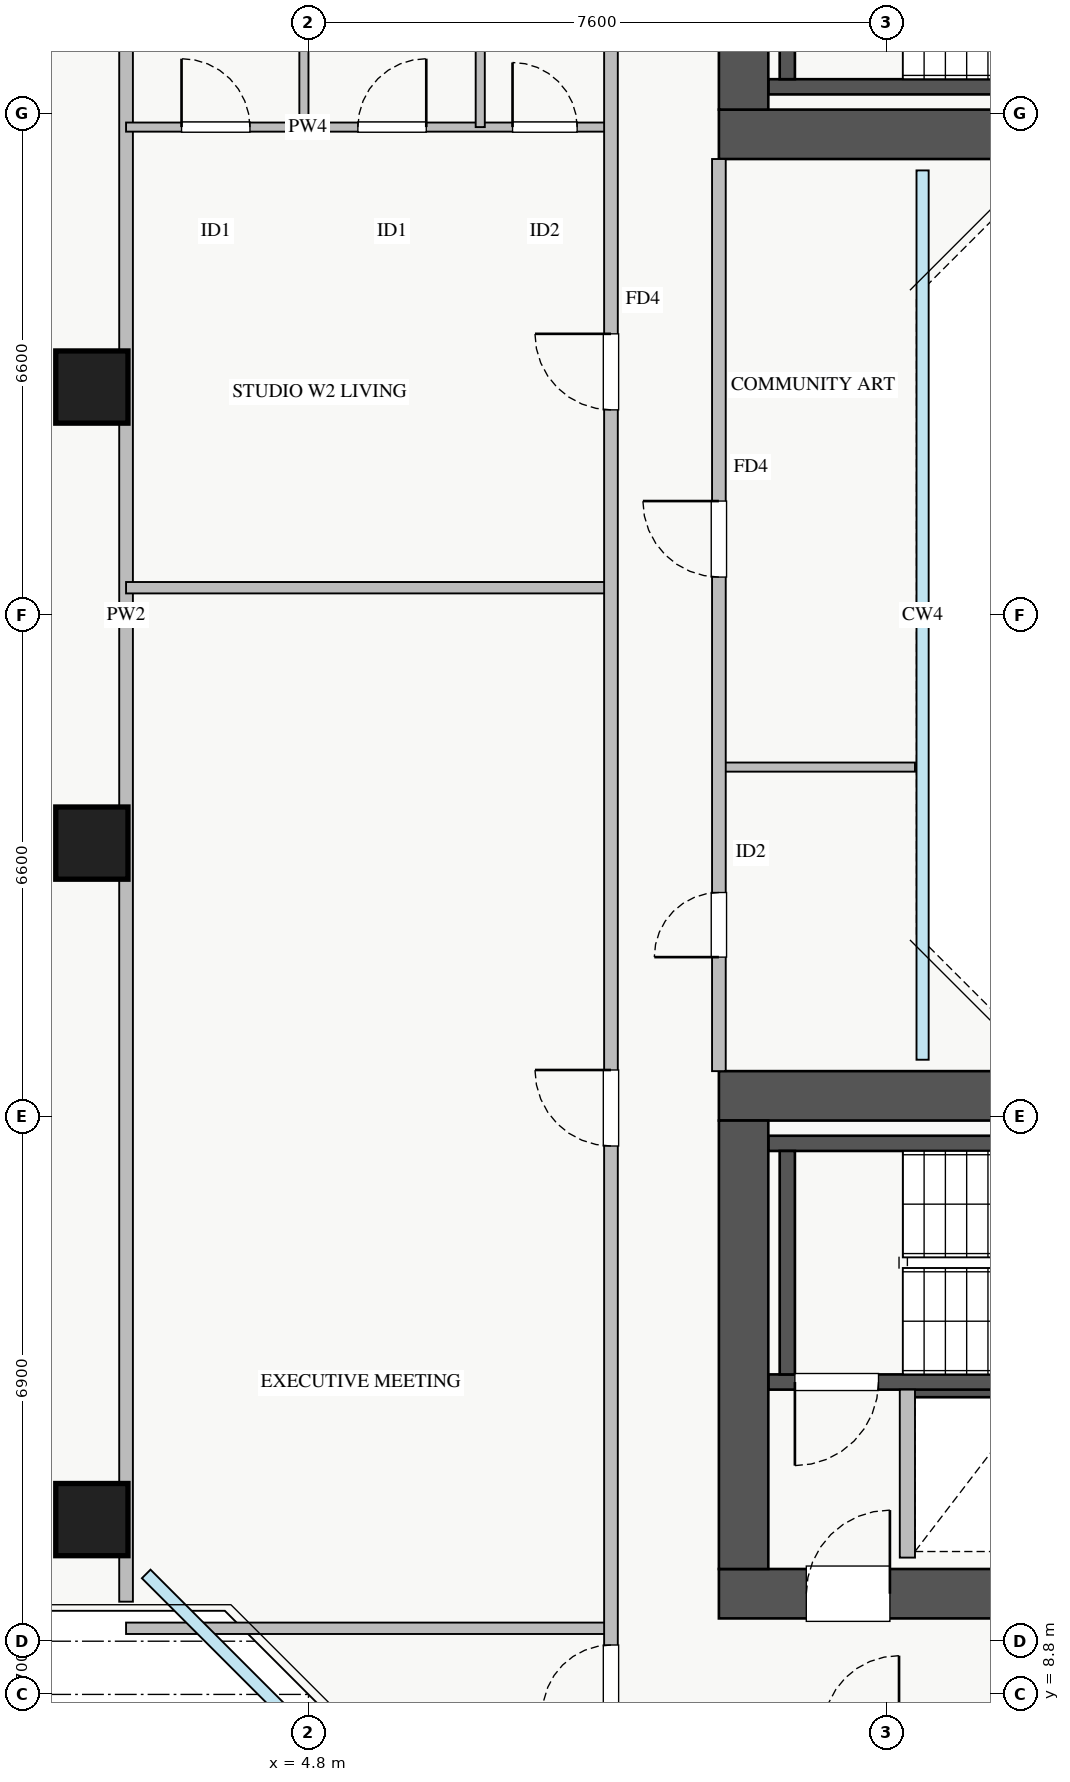
"""IFC4 building model, lengths in metres.
Left out: names, types, materials, properties, quantities, classifications, styles, units other than length and angle.
Written with IfcOpenShell. Run it as: python <this file> out.ifc"""

import sys

from ifc_helpers import new_model, si_unit, direction, frame, frame_2d, origin, origin_2d, place, context, subcontext, project, spatial, rectangle, extrude, source, transform, mapped, element, fill, save


model = new_model("IFC4")
c1 = context("Model", 3, precision=1e-05, world=origin(), true_north=direction((0.0, 1.0)))
c2 = subcontext(c1, "Body", "Model", "MODEL_VIEW")
j1 = project(units=[si_unit("LENGTHUNIT", "METRE"), si_unit("PLANEANGLEUNIT", "RADIAN")], contexts=[c1])
p1 = place(None, origin())
s1 = spatial("IfcSite", under=j1, at=p1, CompositionType="ELEMENT")
p2 = place(p1, origin())
s2 = spatial("IfcBuilding", under=s1, at=p2, CompositionType="ELEMENT")
p3 = place(p2, frame((0.0, 0.0, 173.0)))
s3 = spatial("IfcBuildingStorey", under=s2, at=p3, CompositionType="ELEMENT", Elevation=173.0)
p4 = place(p3, frame((12.68, 12.8, 0.0), z_axis=(0.0, 0.0, 1.0), x_axis=(1.0, 0.0, 0.0)))
e1 = element("IfcWall", 1, at=p4, inside=s3, PredefinedType="SHEAR", context=c2, shape_type="SweptSolid", body=[
    extrude(rectangle(XDim=1.94, YDim=0.18, at=frame_2d((0.97, 0.0))), origin(), (0.0, 0.0, 1.0), 3.0),
])
p5 = place(p3, frame((10.85, 29.95, 0.0), z_axis=(0.0, 0.0, 1.0), x_axis=(1.0, 0.0, 0.0)))
e2 = element("IfcWall", 2, at=p5, inside=s3, PredefinedType="SHEAR", context=c2, shape_type="SweptSolid", body=[
    extrude(rectangle(XDim=7.3, YDim=0.2, at=frame_2d((3.65, 0.0))), origin(), (0.0, 0.0, 1.0), 3.25),
])
p6 = place(p3, frame((11.1, 30.05, 0.0), z_axis=(0.0, 0.0, 1.0), x_axis=(0.0, 1.0, 0.0)))
e3 = element("IfcWall", 3, at=p6, inside=s3, PredefinedType="SHEAR", context=c2, shape_type="SweptSolid", body=[
    extrude(rectangle(XDim=2.94, YDim=0.2, at=frame_2d((1.47, 0.0))), origin(), (0.0, 0.0, 1.0), 3.25),
])
p7 = place(p3, frame((10.85, 12.91, 0.0), z_axis=(0.0, 0.0, 1.0), x_axis=(1.0, 0.0, 0.0)))
e4 = element("IfcWall", 4, at=p7, inside=s3, PredefinedType="SHEAR", context=c2, shape_type="SweptSolid", body=[
    extrude(rectangle(XDim=7.3, YDim=0.2, at=frame_2d((3.65, 0.0))), origin(), (0.0, 0.0, 1.0), 3.25),
])
p8 = place(p7, frame((0.35, 0.0, 0.0)))
e5 = element("IfcOpeningElement", 5, at=p8, cuts=e4, PredefinedType="OPENING", context=c2, shape_type="SweptSolid", body=[
    extrude(rectangle(XDim=1.1, YDim=2.05, at=frame_2d((0.55, 1.025))), frame((0.0, 0.11, 0.0), z_axis=(0.0, -1.0, 0.0), x_axis=(1.0, 0.0, 0.0)), (0.0, 0.0, 1.0), 0.22),
])
p9 = place(p3, frame((10.85, 16.05, 0.0), z_axis=(0.0, 0.0, 1.0), x_axis=(1.0, 0.0, 0.0)))
e6 = element("IfcWall", 6, at=p9, inside=s3, PredefinedType="SHEAR", context=c2, shape_type="SweptSolid", body=[
    extrude(rectangle(XDim=7.3, YDim=0.2, at=frame_2d((3.65, 0.0))), origin(), (0.0, 0.0, 1.0), 3.25),
])
p10 = place(p3, frame((11.1, 13.01, 0.0), z_axis=(0.0, 0.0, 1.0), x_axis=(0.0, 1.0, 0.0)))
e7 = element("IfcWall", 7, at=p10, inside=s3, PredefinedType="SHEAR", context=c2, shape_type="SweptSolid", body=[
    extrude(rectangle(XDim=2.94, YDim=0.2, at=frame_2d((1.47, 0.0))), origin(), (0.0, 0.0, 1.0), 3.25),
])
p11 = place(p3, frame((10.2, 29.325, 0.0), z_axis=(0.0, 0.0, 1.0), x_axis=(1.0, 0.0, 0.0)))
e8 = element("IfcWall", 8, at=p11, inside=s3, PredefinedType="SHEAR", context=c2, shape_type="SweptSolid", body=[
    extrude(rectangle(XDim=17.6, YDim=0.65, at=frame_2d((8.8, 0.0))), origin(), (0.0, 0.0, 1.0), 3.25),
])
p12 = place(p3, frame((10.525, 29.65, 0.0), z_axis=(0.0, 0.0, 1.0), x_axis=(0.0, 1.0, 0.0)))
e9 = element("IfcWall", 9, at=p12, inside=s3, PredefinedType="SHEAR", context=c2, shape_type="SweptSolid", body=[
    extrude(rectangle(XDim=5.9, YDim=0.65, at=frame_2d((2.95, 0.0))), origin(), (0.0, 0.0, 1.0), 3.25),
])
p13 = place(p3, frame((10.2, 10.125, 0.0), z_axis=(0.0, 0.0, 1.0), x_axis=(1.0, 0.0, 0.0)))
e10 = element("IfcWall", 10, at=p13, inside=s3, PredefinedType="SHEAR", context=c2, shape_type="SweptSolid", body=[
    extrude(rectangle(XDim=17.6, YDim=0.65, at=frame_2d((8.8, 0.0))), origin(), (0.0, 0.0, 1.0), 3.25),
])
p14 = place(p13, frame((1.15, 0.0, 0.0)))
e11 = element("IfcOpeningElement", 11, at=p14, cuts=e10, PredefinedType="OPENING", context=c2, shape_type="SweptSolid", body=[
    extrude(rectangle(XDim=1.1, YDim=2.05, at=frame_2d((0.55, 1.025))), frame((0.0, 0.335, 0.0), z_axis=(0.0, -1.0, 0.0), x_axis=(1.0, 0.0, 0.0)), (0.0, 0.0, 1.0), 0.67),
])
p15 = place(p13, frame((8.3, 0.0, 0.0)))
e12 = element("IfcOpeningElement", 12, at=p15, cuts=e10, PredefinedType="OPENING", context=c2, shape_type="SweptSolid", body=[
    extrude(rectangle(XDim=1.1, YDim=2.05, at=frame_2d((0.55, 1.025))), frame((0.0, 0.335, 0.0), z_axis=(0.0, -1.0, 0.0), x_axis=(1.0, 0.0, 0.0)), (0.0, 0.0, 1.0), 0.67),
])
p16 = place(p13, frame((4.9, 0.0, 0.0)))
e13 = element("IfcOpeningElement", 13, at=p16, cuts=e10, PredefinedType="OPENING", context=c2, shape_type="SweptSolid", body=[
    extrude(rectangle(XDim=1.1, YDim=2.05, at=frame_2d((0.55, 1.025))), frame((0.0, 0.335, 0.0), z_axis=(0.0, -1.0, 0.0), x_axis=(1.0, 0.0, 0.0)), (0.0, 0.0, 1.0), 0.67),
])
p17 = place(p13, frame((14.74, 0.0, 0.0)))
e14 = element("IfcOpeningElement", 14, at=p17, cuts=e10, PredefinedType="OPENING", context=c2, shape_type="SweptSolid", body=[
    extrude(rectangle(XDim=1.0, YDim=2.05, at=frame_2d((0.5, 1.025))), frame((0.0, 0.335, 0.0), z_axis=(0.0, -1.0, 0.0), x_axis=(1.0, 0.0, 0.0)), (0.0, 0.0, 1.0), 0.67),
])
p18 = place(p13, frame((10.155, 0.0, 0.0)))
e15 = element("IfcOpeningElement", 15, at=p18, cuts=e10, PredefinedType="OPENING", context=c2, shape_type="SweptSolid", body=[
    extrude(rectangle(XDim=1.0, YDim=2.05, at=frame_2d((0.5, 1.025))), frame((0.0, 0.335, 0.0), z_axis=(0.0, -1.0, 0.0), x_axis=(1.0, 0.0, 0.0)), (0.0, 0.0, 1.0), 0.67),
])
p19 = place(p13, frame((11.87, 0.0, 0.0)))
e16 = element("IfcOpeningElement", 16, at=p19, cuts=e10, PredefinedType="OPENING", context=c2, shape_type="SweptSolid", body=[
    extrude(rectangle(XDim=1.0, YDim=2.05, at=frame_2d((0.5, 1.025))), frame((0.0, 0.335, 0.0), z_axis=(0.0, -1.0, 0.0), x_axis=(1.0, 0.0, 0.0)), (0.0, 0.0, 1.0), 0.67),
])
p20 = place(p13, frame((13.46, 0.0, 0.0)))
e17 = element("IfcOpeningElement", 17, at=p20, cuts=e10, PredefinedType="OPENING", context=c2, shape_type="SweptSolid", body=[
    extrude(rectangle(XDim=1.0, YDim=2.05, at=frame_2d((0.5, 1.025))), frame((0.0, 0.335, 0.0), z_axis=(0.0, -1.0, 0.0), x_axis=(1.0, 0.0, 0.0)), (0.0, 0.0, 1.0), 0.67),
])
p21 = place(p3, frame((10.2, 16.675, 0.0), z_axis=(0.0, 0.0, 1.0), x_axis=(1.0, 0.0, 0.0)))
e18 = element("IfcWall", 18, at=p21, inside=s3, PredefinedType="SHEAR", context=c2, shape_type="SweptSolid", body=[
    extrude(rectangle(XDim=17.6, YDim=0.65, at=frame_2d((8.8, 0.0))), origin(), (0.0, 0.0, 1.0), 3.25),
])
p22 = place(p3, frame((10.525, 10.45, 0.0), z_axis=(0.0, 0.0, 1.0), x_axis=(0.0, 1.0, 0.0)))
e19 = element("IfcWall", 19, at=p22, inside=s3, PredefinedType="SHEAR", context=c2, shape_type="SweptSolid", body=[
    extrude(rectangle(XDim=5.9, YDim=0.65, at=frame_2d((2.95, 0.0))), origin(), (0.0, 0.0, 1.0), 3.25),
])
m1 = source(origin(), c2, "Body", "SweptSolid", [
    extrude(rectangle(XDim=0.95, YDim=0.95, at=origin_2d()), origin(), (0.0, 0.0, 1.0), 3.25),
])
for number, where, z_axis, x_axis in (
    (20, (1.95, 26.0, 0.0), (0.0, 0.0, 1.0), (1.0, 0.0, 0.0)),
    (21, (1.95, 20.0, 0.0), (0.0, 0.0, 1.0), (1.0, 0.0, 0.0)),
    (22, (1.95, 11.1, 0.0), (0.0, 0.0, 1.0), (1.0, 0.0, 0.0)),
):
    element("IfcColumn", number, at=place(p3, frame(where, z_axis=z_axis, x_axis=x_axis)), inside=s3, PredefinedType="COLUMN", context=c2, shape_type="MappedRepresentation", body=[
        mapped(m1, transform((0.0, 0.0, 0.0), x_axis=(1.0, 0.0, 0.0), y_axis=(0.0, 1.0, 0.0), z_axis=(0.0, 0.0, 1.0), scale=1.0)),
    ])
p23 = place(p3, frame((12.68, 10.6, 0.0), z_axis=(0.0, 0.0, 1.0), x_axis=(0.0, 1.0, 0.0)))
e23 = element("IfcWall", 23, at=p23, inside=s3, PredefinedType="PARTITIONING", context=c2, shape_type="SweptSolid", body=[
    extrude(rectangle(XDim=2.21, YDim=0.2, at=frame_2d((1.105, 0.0))), origin(), (0.0, 0.0, 1.0), 3.0),
])
p24 = place(p3, frame((2.4, 10.02, 0.0), z_axis=(0.0, 0.0, 1.0), x_axis=(0.0, 1.0, 0.0)))
e24 = element("IfcWall", 24, at=p24, inside=s3, PredefinedType="PARTITIONING", context=c2, shape_type="SweptSolid", body=[
    extrude(rectangle(XDim=25.96, YDim=0.18, at=frame_2d((12.98, 0.0))), origin(), (0.0, 0.0, 1.0), 3.0),
])
p25 = place(p3, frame((2.4, 9.67, 0.0), z_axis=(0.0, 0.0, 1.0), x_axis=(1.0, 0.0, 0.0)))
e25 = element("IfcWall", 25, at=p25, inside=s3, PredefinedType="PARTITIONING", context=c2, shape_type="SweptSolid", body=[
    extrude(rectangle(XDim=6.38, YDim=0.15, at=frame_2d((3.19, 0.0))), origin(), (0.0, 0.0, 1.0), 3.0),
])
p26 = place(p3, frame((2.4, 29.42, 0.0), z_axis=(0.0, 0.0, 1.0), x_axis=(1.0, 0.0, 0.0)))
e26 = element("IfcWall", 26, at=p26, inside=s3, PredefinedType="PLUMBINGWALL", context=c2, shape_type="SweptSolid", body=[
    extrude(rectangle(XDim=6.38, YDim=0.12, at=frame_2d((3.19, 0.0))), origin(), (0.0, 0.0, 1.0), 3.0),
])
p27 = place(p26, frame((0.73, 0.0, 0.0)))
e27 = element("IfcOpeningElement", 27, at=p27, cuts=e26, PredefinedType="OPENING", context=c2, shape_type="SweptSolid", body=[
    extrude(rectangle(XDim=0.9, YDim=2.05, at=frame_2d((0.45, 1.025))), frame((0.0, 0.07, 0.0), z_axis=(0.0, -1.0, 0.0), x_axis=(1.0, 0.0, 0.0)), (0.0, 0.0, 1.0), 0.14),
])
p28 = place(p26, frame((3.05, 0.0, 0.0)))
e28 = element("IfcOpeningElement", 28, at=p28, cuts=e26, PredefinedType="OPENING", context=c2, shape_type="SweptSolid", body=[
    extrude(rectangle(XDim=0.9, YDim=2.05, at=frame_2d((0.45, 1.025))), frame((0.0, 0.07, 0.0), z_axis=(0.0, -1.0, 0.0), x_axis=(1.0, 0.0, 0.0)), (0.0, 0.0, 1.0), 0.14),
])
p29 = place(p26, frame((5.085, 0.0, 0.0)))
e29 = element("IfcOpeningElement", 29, at=p29, cuts=e26, PredefinedType="OPENING", context=c2, shape_type="SweptSolid", body=[
    extrude(rectangle(XDim=0.85, YDim=2.05, at=frame_2d((0.425, 1.025))), frame((0.0, 0.07, 0.0), z_axis=(0.0, -1.0, 0.0), x_axis=(1.0, 0.0, 0.0)), (0.0, 0.0, 1.0), 0.14),
])
p30 = place(p3, frame((4.74, 29.42, 0.0), z_axis=(0.0, 0.0, 1.0), x_axis=(0.0, 1.0, 0.0)))
e30 = element("IfcWall", 30, at=p30, inside=s3, PredefinedType="PLUMBINGWALL", context=c2, shape_type="SweptSolid", body=[
    extrude(rectangle(XDim=6.56, YDim=0.12, at=frame_2d((3.28, 0.0))), origin(), (0.0, 0.0, 1.0), 3.0),
])
p31 = place(p3, frame((7.06, 29.42, 0.0), z_axis=(0.0, 0.0, 1.0), x_axis=(0.0, 1.0, 0.0)))
e31 = element("IfcWall", 31, at=p31, inside=s3, PredefinedType="PLUMBINGWALL", context=c2, shape_type="SweptSolid", body=[
    extrude(rectangle(XDim=6.56, YDim=0.12, at=frame_2d((3.28, 0.0))), origin(), (0.0, 0.0, 1.0), 2.495),
])
p32 = place(p3, frame((2.4, 23.36, 0.0), z_axis=(0.0, 0.0, 1.0), x_axis=(1.0, 0.0, 0.0)))
e32 = element("IfcWall", 32, at=p32, inside=s3, PredefinedType="PARTITIONING", context=c2, shape_type="SweptSolid", body=[
    extrude(rectangle(XDim=6.38, YDim=0.15, at=frame_2d((3.19, 0.0))), origin(), (0.0, 0.0, 1.0), 3.0),
])
p33 = place(p3, frame((8.78, 8.31, 0.0), z_axis=(0.0, 0.0, 1.0), x_axis=(0.0, 1.0, 0.0)))
e33 = element("IfcWall", 33, at=p33, inside=s3, PredefinedType="PARTITIONING", context=c2, shape_type="SweptSolid", body=[
    extrude(rectangle(XDim=29.34, YDim=0.18, at=frame_2d((14.67, 0.0))), origin(), (0.0, 0.0, 1.0), 3.0),
])
p34 = place(p33, frame((28.045, 0.0, 0.0)))
e34 = element("IfcOpeningElement", 34, at=p34, cuts=e33, PredefinedType="OPENING", context=c2, shape_type="SweptSolid", body=[
    extrude(rectangle(XDim=0.9, YDim=2.05, at=frame_2d((0.45, 1.025))), frame((0.0, 0.1, 0.0), z_axis=(0.0, -1.0, 0.0), x_axis=(1.0, 0.0, 0.0)), (0.0, 0.0, 1.0), 0.2),
])
p35 = place(p33, frame((0.24, 0.0, 0.0)))
e35 = element("IfcOpeningElement", 35, at=p35, cuts=e33, PredefinedType="OPENING", context=c2, shape_type="SweptSolid", body=[
    extrude(rectangle(XDim=0.9, YDim=2.05, at=frame_2d((0.45, 1.025))), frame((0.0, 0.1, 0.0), z_axis=(0.0, -1.0, 0.0), x_axis=(1.0, 0.0, 0.0)), (0.0, 0.0, 1.0), 0.2),
])
p36 = place(p33, frame((7.705, 0.0, 0.0)))
e36 = element("IfcOpeningElement", 36, at=p36, cuts=e33, PredefinedType="OPENING", context=c2, shape_type="SweptSolid", body=[
    extrude(rectangle(XDim=1.0, YDim=2.05, at=frame_2d((0.5, 1.025))), frame((0.0, 0.1, 0.0), z_axis=(0.0, -1.0, 0.0), x_axis=(1.0, 0.0, 0.0)), (0.0, 0.0, 1.0), 0.2),
])
p37 = place(p33, frame((17.39, 0.0, 0.0)))
e37 = element("IfcOpeningElement", 37, at=p37, cuts=e33, PredefinedType="OPENING", context=c2, shape_type="SweptSolid", body=[
    extrude(rectangle(XDim=1.0, YDim=2.05, at=frame_2d((0.5, 1.025))), frame((0.0, 0.1, 0.0), z_axis=(0.0, -1.0, 0.0), x_axis=(1.0, 0.0, 0.0)), (0.0, 0.0, 1.0), 0.2),
])
p38 = place(p3, frame((10.2, 21.0, 0.0), z_axis=(0.0, 0.0, 1.0), x_axis=(1.0, 0.0, 0.0)))
e38 = element("IfcWall", 38, at=p38, inside=s3, PredefinedType="PLUMBINGWALL", context=c2, shape_type="SweptSolid", body=[
    extrude(rectangle(XDim=2.58, YDim=0.12, at=frame_2d((1.29, 0.0))), origin(), (0.0, 0.0, 1.0), 3.0),
])
p39 = place(p3, frame((10.2, 17.0, 0.0), z_axis=(0.0, 0.0, 1.0), x_axis=(0.0, 1.0, 0.0)))
e39 = element("IfcWall", 39, at=p39, inside=s3, PredefinedType="PARTITIONING", context=c2, shape_type="SweptSolid", body=[
    extrude(rectangle(XDim=12.0, YDim=0.18, at=frame_2d((6.0, 0.0))), origin(), (0.0, 0.0, 1.0), 3.0),
])
p40 = place(p39, frame((1.5, 0.0, 0.0)))
e40 = element("IfcOpeningElement", 40, at=p40, cuts=e39, PredefinedType="OPENING", context=c2, shape_type="SweptSolid", body=[
    extrude(rectangle(XDim=0.85, YDim=2.05, at=frame_2d((0.425, 1.025))), frame((0.0, 0.1, 0.0), z_axis=(0.0, -1.0, 0.0), x_axis=(1.0, 0.0, 0.0)), (0.0, 0.0, 1.0), 0.2),
])
p41 = place(p39, frame((6.5, 0.0, 0.0)))
e41 = element("IfcOpeningElement", 41, at=p41, cuts=e39, PredefinedType="OPENING", context=c2, shape_type="SweptSolid", body=[
    extrude(rectangle(XDim=1.0, YDim=2.05, at=frame_2d((0.5, 1.025))), frame((0.0, 0.1, 0.0), z_axis=(0.0, -1.0, 0.0), x_axis=(1.0, 0.0, 0.0)), (0.0, 0.0, 1.0), 0.2),
])
m2 = source(origin(), c2, "Body", "SweptSolid", [
    extrude(rectangle(XDim=1.1, YDim=2.05, at=frame_2d((0.55, 1.025))), frame((0.0, 0.025, 0.0), z_axis=(0.0, -1.0, 0.0), x_axis=(1.0, 0.0, 0.0)), (0.0, 0.0, 1.0), 0.05),
])
p42 = place(p14, origin())
e42 = element("IfcDoor", 42, at=p42, inside=s3, OperationType="SINGLE_SWING_RIGHT", PredefinedType="DOOR", context=c2, shape_type="MappedRepresentation", body=[
    mapped(m2, transform((0.0, 0.0, 0.0), x_axis=(1.0, 0.0, 0.0), y_axis=(0.0, 1.0, 0.0), z_axis=(0.0, 0.0, 1.0), scale=1.0)),
])
fill(e11, e42)
p43 = place(p8, frame((1.1, 0.0, 0.0), z_axis=(0.0, 0.0, 1.0), x_axis=(-1.0, 0.0, 0.0)))
e43 = element("IfcDoor", 43, at=p43, inside=s3, OperationType="SINGLE_SWING_LEFT", PredefinedType="DOOR", context=c2, shape_type="MappedRepresentation", body=[
    mapped(m2, transform((0.0, 0.0, 0.0), x_axis=(1.0, 0.0, 0.0), y_axis=(0.0, 1.0, 0.0), z_axis=(0.0, 0.0, 1.0), scale=1.0)),
])
fill(e5, e43)
m3 = source(origin(), c2, "Body", "SweptSolid", [
    extrude(rectangle(XDim=0.9, YDim=2.05, at=frame_2d((0.45, 1.025))), frame((0.0, 0.025, 0.0), z_axis=(0.0, -1.0, 0.0), x_axis=(1.0, 0.0, 0.0)), (0.0, 0.0, 1.0), 0.05),
])
p44 = place(p27, origin())
e44 = element("IfcDoor", 44, at=p44, inside=s3, OperationType="SINGLE_SWING_LEFT", PredefinedType="DOOR", context=c2, shape_type="MappedRepresentation", body=[
    mapped(m3, transform((0.0, 0.0, 0.0), x_axis=(1.0, 0.0, 0.0), y_axis=(0.0, 1.0, 0.0), z_axis=(0.0, 0.0, 1.0), scale=1.0)),
])
fill(e27, e44)
p45 = place(p28, origin())
e45 = element("IfcDoor", 45, at=p45, inside=s3, OperationType="SINGLE_SWING_RIGHT", PredefinedType="DOOR", context=c2, shape_type="MappedRepresentation", body=[
    mapped(m3, transform((0.0, 0.0, 0.0), x_axis=(1.0, 0.0, 0.0), y_axis=(0.0, 1.0, 0.0), z_axis=(0.0, 0.0, 1.0), scale=1.0)),
])
fill(e28, e45)
m4 = source(origin(), c2, "Body", "SweptSolid", [
    extrude(rectangle(XDim=0.85, YDim=2.05, at=frame_2d((0.425, 1.025))), frame((0.0, 0.025, 0.0), z_axis=(0.0, -1.0, 0.0), x_axis=(1.0, 0.0, 0.0)), (0.0, 0.0, 1.0), 0.05),
])
p46 = place(p29, origin())
e46 = element("IfcDoor", 46, at=p46, inside=s3, OperationType="SINGLE_SWING_LEFT", PredefinedType="DOOR", context=c2, shape_type="MappedRepresentation", body=[
    mapped(m4, transform((0.0, 0.0, 0.0), x_axis=(1.0, 0.0, 0.0), y_axis=(0.0, 1.0, 0.0), z_axis=(0.0, 0.0, 1.0), scale=1.0)),
])
fill(e29, e46)
p47 = place(p35, origin())
e47 = element("IfcDoor", 47, at=p47, inside=s3, OperationType="SINGLE_SWING_LEFT", PredefinedType="DOOR", context=c2, shape_type="MappedRepresentation", body=[
    mapped(m3, transform((0.0, 0.0, 0.0), x_axis=(1.0, 0.0, 0.0), y_axis=(0.0, 1.0, 0.0), z_axis=(0.0, 0.0, 1.0), scale=1.0)),
])
fill(e35, e47)
m5 = source(origin(), c2, "Body", "SweptSolid", [
    extrude(rectangle(XDim=1.0, YDim=2.05, at=frame_2d((0.5, 1.025))), frame((0.0, 0.025, 0.0), z_axis=(0.0, -1.0, 0.0), x_axis=(1.0, 0.0, 0.0)), (0.0, 0.0, 1.0), 0.05),
])
p48 = place(p36, origin())
e48 = element("IfcDoor", 48, at=p48, inside=s3, OperationType="SINGLE_SWING_RIGHT", PredefinedType="DOOR", context=c2, shape_type="MappedRepresentation", body=[
    mapped(m5, transform((0.0, 0.0, 0.0), x_axis=(1.0, 0.0, 0.0), y_axis=(0.0, 1.0, 0.0), z_axis=(0.0, 0.0, 1.0), scale=1.0)),
])
fill(e36, e48)
p49 = place(p37, origin())
e49 = element("IfcDoor", 49, at=p49, inside=s3, OperationType="SINGLE_SWING_RIGHT", PredefinedType="DOOR", context=c2, shape_type="MappedRepresentation", body=[
    mapped(m5, transform((0.0, 0.0, 0.0), x_axis=(1.0, 0.0, 0.0), y_axis=(0.0, 1.0, 0.0), z_axis=(0.0, 0.0, 1.0), scale=1.0)),
])
fill(e37, e49)
p50 = place(p40, origin())
e50 = element("IfcDoor", 50, at=p50, inside=s3, OperationType="SINGLE_SWING_LEFT", PredefinedType="DOOR", context=c2, shape_type="MappedRepresentation", body=[
    mapped(m4, transform((0.0, 0.0, 0.0), x_axis=(1.0, 0.0, 0.0), y_axis=(0.0, 1.0, 0.0), z_axis=(0.0, 0.0, 1.0), scale=1.0)),
])
fill(e40, e50)
p51 = place(p41, origin())
e51 = element("IfcDoor", 51, at=p51, inside=s3, OperationType="SINGLE_SWING_RIGHT", PredefinedType="DOOR", context=c2, shape_type="MappedRepresentation", body=[
    mapped(m5, transform((0.0, 0.0, 0.0), x_axis=(1.0, 0.0, 0.0), y_axis=(0.0, 1.0, 0.0), z_axis=(0.0, 0.0, 1.0), scale=1.0)),
])
fill(e41, e51)
save(model, sys.argv[1])
